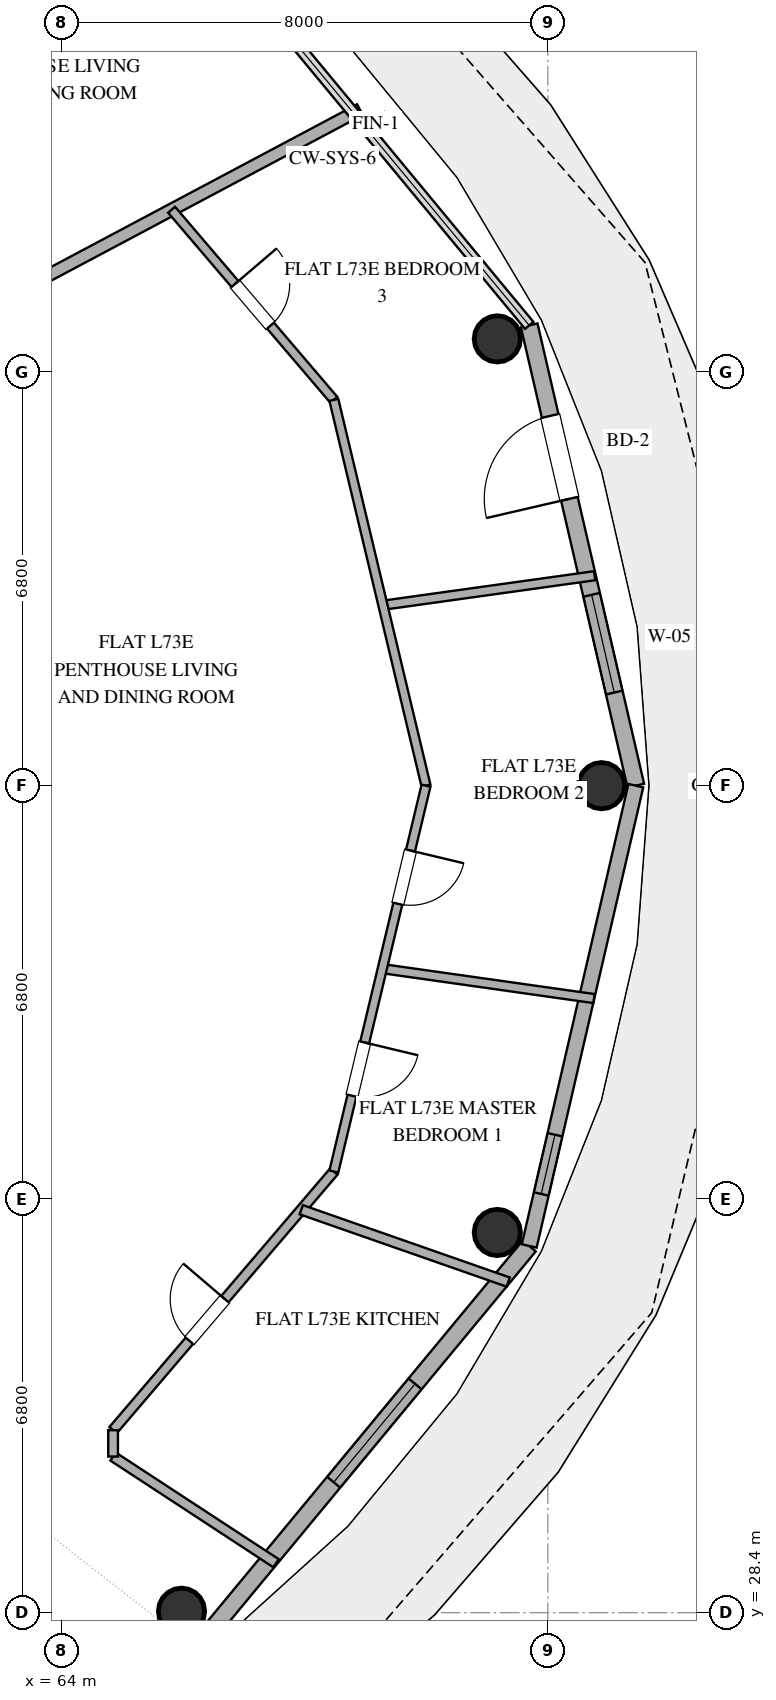
"""IFC4 building model, lengths in metres.
Left out: names, types, materials, properties, quantities, classifications, styles, units other than length and angle.
Written with IfcOpenShell. Run it as: python <this file> out.ifc"""

import sys

from ifc_helpers import new_model, si_unit, direction, frame, frame_2d, origin, origin_2d, place, context, subcontext, project, spatial, rectangle, hollow_circle, extrude, element, fill, save


model = new_model("IFC4")
c1 = context("Model", 3, precision=1e-05, world=origin(), true_north=direction((0.0, 1.0)))
c2 = subcontext(c1, "Body", "Model", "MODEL_VIEW")
j1 = project(units=[si_unit("LENGTHUNIT", "METRE"), si_unit("PLANEANGLEUNIT", "RADIAN")], contexts=[c1])
p1 = place(None, origin())
s1 = spatial("IfcSite", under=j1, at=p1, CompositionType="ELEMENT")
p2 = place(p1, origin())
s2 = spatial("IfcBuilding", under=s1, at=p2, CompositionType="ELEMENT")
p3 = place(p2, frame((0.0, 0.0, 283.8)))
s3 = spatial("IfcBuildingStorey", under=s2, at=p3, CompositionType="ELEMENT", Elevation=283.8)
for number, where, z_axis, x_axis in (
    (1, (72.883, 42.0, 0.0), (0.0, 0.0, 1.0), (1.0, 0.0, 0.0)),
    (2, (71.169, 49.347, 0.0), (0.0, 0.0, 1.0), (1.0, 0.0, 0.0)),
    (3, (65.975, 28.424, 0.0), (0.0, 0.0, 1.0), (1.0, 0.0, 0.0)),
    (4, (71.169, 34.653, 0.0), (0.0, 0.0, 1.0), (1.0, 0.0, 0.0)),
):
    element("IfcColumn", number, at=place(p3, frame(where, z_axis=z_axis, x_axis=x_axis)), inside=s3, PredefinedType="COLUMN", context=c2, shape_type="SweptSolid", body=[
        extrude(hollow_circle(Radius=0.381, WallThickness=0.025, at=origin_2d()), origin(), (0.0, 0.0, 1.0), 3.37),
    ])
p4 = place(p3, frame((73.447, 42.0, 0.0), z_axis=(0.0, 0.0, 1.0), x_axis=(-0.225635078214, 0.974211892495, 0.0)))
e5 = element("IfcWall", 5, at=p4, inside=s3, PredefinedType="SOLIDWALL", context=c2, shape_type="SweptSolid", body=[
    extrude(rectangle(XDim=7.77, YDim=0.28, at=frame_2d((3.885, 0.0))), origin(), (0.0, 0.0, 1.0), 3.37),
])
p5 = place(p4, frame((1.572, 0.0, 0.85)))
e6 = element("IfcOpeningElement", 6, at=p5, cuts=e5, PredefinedType="OPENING", context=c2, shape_type="SweptSolid", body=[
    extrude(rectangle(XDim=1.65, YDim=2.0, at=frame_2d((0.825, 1.0))), frame((0.0, 0.15, 0.0), z_axis=(0.0, -1.0, 0.0), x_axis=(1.0, 0.0, 0.0)), (0.0, 0.0, 1.0), 0.3),
])
p6 = place(p4, frame((4.842, 0.0, 0.0)))
e7 = element("IfcOpeningElement", 7, at=p6, cuts=e5, PredefinedType="OPENING", context=c2, shape_type="SweptSolid", body=[
    extrude(rectangle(XDim=1.4, YDim=2.2, at=frame_2d((0.7, 1.1))), frame((0.0, 0.15, 0.0), z_axis=(0.0, -1.0, 0.0), x_axis=(1.0, 0.0, 0.0)), (0.0, 0.0, 1.0), 0.3),
])
p7 = place(p3, frame((66.383, 28.013, 0.0), z_axis=(0.0, 0.0, 1.0), x_axis=(0.63761509934, 0.770355103243, 0.0)))
e8 = element("IfcWall", 8, at=p7, inside=s3, PredefinedType="SOLIDWALL", context=c2, shape_type="SweptSolid", body=[
    extrude(rectangle(XDim=8.33, YDim=0.28, at=frame_2d((4.165, 0.0))), origin(), (0.0, 0.0, 1.0), 3.37),
])
p8 = place(p7, frame((3.286, 0.0, 0.85)))
e9 = element("IfcOpeningElement", 9, at=p8, cuts=e8, PredefinedType="OPENING", context=c2, shape_type="SweptSolid", body=[
    extrude(rectangle(XDim=2.1, YDim=2.2, at=frame_2d((1.05, 1.1))), frame((0.0, 0.15, 0.0), z_axis=(0.0, -1.0, 0.0), x_axis=(1.0, 0.0, 0.0)), (0.0, 0.0, 1.0), 0.3),
])
p9 = place(p3, frame((71.694, 34.43, 0.0), z_axis=(0.0, 0.0, 1.0), x_axis=(0.225635078214, 0.974211892495, 0.0)))
e10 = element("IfcWall", 10, at=p9, inside=s3, PredefinedType="SOLIDWALL", context=c2, shape_type="SweptSolid", body=[
    extrude(rectangle(XDim=7.77, YDim=0.25, at=frame_2d((3.885, 0.0))), origin(), (0.0, 0.0, 1.0), 3.37),
])
p10 = place(p9, frame((0.878, 0.0, 0.35)))
e11 = element("IfcOpeningElement", 11, at=p10, cuts=e10, PredefinedType="OPENING", context=c2, shape_type="SweptSolid", body=[
    extrude(rectangle(XDim=1.0, YDim=1.05, at=frame_2d((0.5, 0.525))), frame((0.0, 0.135, 0.0), z_axis=(0.0, -1.0, 0.0), x_axis=(1.0, 0.0, 0.0)), (0.0, 0.0, 1.0), 0.27),
])
p11 = place(p3, frame((68.909, 53.118, 0.0), z_axis=(0.0, 0.0, 1.0), x_axis=(-0.882939716422, -0.469486375909, 0.0)))
e12 = element("IfcWall", 12, at=p11, inside=s3, PredefinedType="PARTITIONING", context=c2, shape_type="SweptSolid", body=[
    extrude(rectangle(XDim=8.732, YDim=0.2, at=frame_2d((4.366, 0.0))), origin(), (0.0, 0.0, 1.0), 2.73),
])
p12 = place(p3, frame((64.85, 31.401, 0.0), z_axis=(0.0, 0.0, 1.0), x_axis=(0.649208179997, 0.760610767097, 0.0)))
e13 = element("IfcWall", 13, at=p12, inside=s3, PredefinedType="PLUMBINGWALL", context=c2, shape_type="SweptSolid", body=[
    extrude(rectangle(XDim=5.593, YDim=0.16, at=frame_2d((2.796, 0.0))), origin(), (0.0, 0.0, 1.0), 2.73),
])
p13 = place(p12, frame((1.933, 0.0, 0.0)))
e14 = element("IfcOpeningElement", 14, at=p13, cuts=e13, PredefinedType="OPENING", context=c2, shape_type="SweptSolid", body=[
    extrude(rectangle(XDim=0.9, YDim=2.1, at=frame_2d((0.45, 1.05))), frame((0.0, 0.09, 0.0), z_axis=(0.0, -1.0, 0.0), x_axis=(1.0, 0.0, 0.0)), (0.0, 0.0, 1.0), 0.18),
])
p14 = place(p3, frame((65.812, 51.471, 0.0), z_axis=(0.0, 0.0, 1.0), x_axis=(0.649224667474, -0.760596694145, 0.0)))
e15 = element("IfcWall", 15, at=p14, inside=s3, PredefinedType="PARTITIONING", context=c2, shape_type="SweptSolid", body=[
    extrude(rectangle(XDim=4.11, YDim=0.15, at=frame_2d((2.055, 0.0))), origin(), (0.0, 0.0, 1.0), 2.73),
])
p15 = place(p14, frame((1.605, 0.0, 0.0)))
e16 = element("IfcOpeningElement", 16, at=p15, cuts=e15, PredefinedType="OPENING", context=c2, shape_type="SweptSolid", body=[
    extrude(rectangle(XDim=0.9, YDim=2.1, at=frame_2d((0.45, 1.05))), frame((0.0, 0.085, 0.0), z_axis=(0.0, -1.0, 0.0), x_axis=(1.0, 0.0, 0.0)), (0.0, 0.0, 1.0), 0.17),
])
p16 = place(p3, frame((71.348, 33.837, 0.0), z_axis=(0.0, 0.0, 1.0), x_axis=(-0.943978629209, 0.330006587202, 0.0)))
e17 = element("IfcWall", 17, at=p16, inside=s3, PredefinedType="PLUMBINGWALL", context=c2, shape_type="SweptSolid", body=[
    extrude(rectangle(XDim=3.606, YDim=0.16, at=frame_2d((1.803, 0.0))), origin(), (0.0, 0.0, 1.0), 2.73),
])
p17 = place(p3, frame((69.288, 44.967, 0.0), z_axis=(0.0, 0.0, 1.0), x_axis=(0.990426984163, 0.138037636323, 0.0)))
e18 = element("IfcWall", 18, at=p17, inside=s3, PredefinedType="PARTITIONING", context=c2, shape_type="SweptSolid", body=[
    extrude(rectangle(XDim=3.516, YDim=0.15, at=frame_2d((1.758, 0.0))), origin(), (0.0, 0.0, 1.0), 2.73),
])
p18 = place(p3, frame((72.759, 38.499, 0.0), z_axis=(0.0, 0.0, 1.0), x_axis=(-0.990152617328, 0.139992122627, 0.0)))
e19 = element("IfcWall", 19, at=p18, inside=s3, PredefinedType="PARTITIONING", context=c2, shape_type="SweptSolid", body=[
    extrude(rectangle(XDim=3.516, YDim=0.15, at=frame_2d((1.758, 0.0))), origin(), (0.0, 0.0, 1.0), 2.73),
])
p19 = place(p3, frame((68.481, 48.345, 0.0), z_axis=(0.0, 0.0, 1.0), x_axis=(0.232298462197, -0.972644551962, 0.0)))
e20 = element("IfcWall", 20, at=p19, inside=s3, PredefinedType="PARTITIONING", context=c2, shape_type="SweptSolid", body=[
    extrude(rectangle(XDim=6.523, YDim=0.15, at=frame_2d((3.262, 0.0))), origin(), (0.0, 0.0, 1.0), 2.73),
])
p20 = place(p3, frame((69.996, 42.0, 0.0), z_axis=(0.0, 0.0, 1.0), x_axis=(-0.232298462197, -0.972644551962, 0.0)))
e21 = element("IfcWall", 21, at=p20, inside=s3, PredefinedType="PARTITIONING", context=c2, shape_type="SweptSolid", body=[
    extrude(rectangle(XDim=6.523, YDim=0.15, at=frame_2d((3.262, 0.0))), origin(), (0.0, 0.0, 1.0), 2.73),
])
p21 = place(p20, frame((4.342, 0.0, 0.0)))
e22 = element("IfcOpeningElement", 22, at=p21, cuts=e21, PredefinedType="OPENING", context=c2, shape_type="SweptSolid", body=[
    extrude(rectangle(XDim=0.9, YDim=2.1, at=frame_2d((0.45, 1.05))), frame((0.0, 0.085, 0.0), z_axis=(0.0, -1.0, 0.0), x_axis=(1.0, 0.0, 0.0)), (0.0, 0.0, 1.0), 0.17),
])
p22 = place(p20, frame((1.097, 0.0, 0.0)))
e23 = element("IfcOpeningElement", 23, at=p22, cuts=e21, PredefinedType="OPENING", context=c2, shape_type="SweptSolid", body=[
    extrude(rectangle(XDim=0.9, YDim=2.1, at=frame_2d((0.45, 1.05))), frame((0.0, 0.085, 0.0), z_axis=(0.0, -1.0, 0.0), x_axis=(1.0, 0.0, 0.0)), (0.0, 0.0, 1.0), 0.17),
])
p23 = place(p3, frame((67.53, 29.213, 0.0), z_axis=(0.0, 0.0, 1.0), x_axis=(-0.836629755679, 0.547768794212, 0.0)))
e24 = element("IfcWall", 24, at=p23, inside=s3, PredefinedType="PLUMBINGWALL", context=c2, shape_type="SweptSolid", body=[
    extrude(rectangle(XDim=3.203, YDim=0.16, at=frame_2d((1.602, 0.0))), origin(), (0.0, 0.0, 1.0), 2.73),
])
p24 = place(p3, frame((64.85, 30.968, 0.0), z_axis=(0.0, 0.0, 1.0), x_axis=(0.0, 1.0, 0.0)))
e25 = element("IfcWall", 25, at=p24, inside=s3, PredefinedType="PLUMBINGWALL", context=c2, shape_type="SweptSolid", body=[
    extrude(rectangle(XDim=0.434, YDim=0.16, at=frame_2d((0.217, 0.0))), origin(), (0.0, 0.0, 1.0), 2.73),
])
p25 = place(p5, origin())
e26 = element("IfcWindow", 26, at=p25, inside=s3, PartitioningType="SINGLE_PANEL", PredefinedType="WINDOW", context=c2, shape_type="SweptSolid", body=[
    extrude(rectangle(XDim=1.65, YDim=2.0, at=frame_2d((0.825, 1.0))), frame((0.0, 0.03, 0.0), z_axis=(0.0, -1.0, 0.0), x_axis=(1.0, 0.0, 0.0)), (0.0, 0.0, 1.0), 0.06),
])
fill(e6, e26)
p26 = place(p6, origin())
e27 = element("IfcDoor", 27, at=p26, inside=s3, OperationType="SINGLE_SWING_LEFT", PredefinedType="DOOR", context=c2, shape_type="SweptSolid", body=[
    extrude(rectangle(XDim=1.4, YDim=2.2, at=frame_2d((0.7, 1.1))), frame((0.0, 0.025, 0.0), z_axis=(0.0, -1.0, 0.0), x_axis=(1.0, 0.0, 0.0)), (0.0, 0.0, 1.0), 0.05),
])
fill(e7, e27)
p27 = place(p8, origin())
e28 = element("IfcWindow", 28, at=p27, inside=s3, PartitioningType="SINGLE_PANEL", PredefinedType="WINDOW", context=c2, shape_type="SweptSolid", body=[
    extrude(rectangle(XDim=2.1, YDim=2.2, at=frame_2d((1.05, 1.1))), frame((0.0, 0.03, 0.0), z_axis=(0.0, -1.0, 0.0), x_axis=(1.0, 0.0, 0.0)), (0.0, 0.0, 1.0), 0.06),
])
fill(e9, e28)
p28 = place(p10, origin())
e29 = element("IfcWindow", 29, at=p28, inside=s3, PartitioningType="SINGLE_PANEL", PredefinedType="WINDOW", context=c2, shape_type="SweptSolid", body=[
    extrude(rectangle(XDim=1.0, YDim=1.05, at=frame_2d((0.5, 0.525))), frame((0.0, 0.03, 0.0), z_axis=(0.0, -1.0, 0.0), x_axis=(1.0, 0.0, 0.0)), (0.0, 0.0, 1.0), 0.06),
])
fill(e11, e29)
p29 = place(p13, origin())
e30 = element("IfcDoor", 30, at=p29, inside=s3, OperationType="SINGLE_SWING_RIGHT", PredefinedType="DOOR", context=c2, shape_type="SweptSolid", body=[
    extrude(rectangle(XDim=0.9, YDim=2.1, at=frame_2d((0.45, 1.05))), frame((0.0, 0.025, 0.0), z_axis=(0.0, -1.0, 0.0), x_axis=(1.0, 0.0, 0.0)), (0.0, 0.0, 1.0), 0.05),
])
fill(e14, e30)
p30 = place(p15, origin())
e31 = element("IfcDoor", 31, at=p30, inside=s3, OperationType="SINGLE_SWING_LEFT", PredefinedType="DOOR", context=c2, shape_type="SweptSolid", body=[
    extrude(rectangle(XDim=0.9, YDim=2.1, at=frame_2d((0.45, 1.05))), frame((0.0, 0.025, 0.0), z_axis=(0.0, -1.0, 0.0), x_axis=(1.0, 0.0, 0.0)), (0.0, 0.0, 1.0), 0.05),
])
fill(e16, e31)
p31 = place(p21, origin())
e32 = element("IfcDoor", 32, at=p31, inside=s3, OperationType="SINGLE_SWING_LEFT", PredefinedType="DOOR", context=c2, shape_type="SweptSolid", body=[
    extrude(rectangle(XDim=0.9, YDim=2.1, at=frame_2d((0.45, 1.05))), frame((0.0, 0.025, 0.0), z_axis=(0.0, -1.0, 0.0), x_axis=(1.0, 0.0, 0.0)), (0.0, 0.0, 1.0), 0.05),
])
fill(e22, e32)
p32 = place(p22, origin())
e33 = element("IfcDoor", 33, at=p32, inside=s3, OperationType="SINGLE_SWING_LEFT", PredefinedType="DOOR", context=c2, shape_type="SweptSolid", body=[
    extrude(rectangle(XDim=0.9, YDim=2.1, at=frame_2d((0.45, 1.05))), frame((0.0, 0.025, 0.0), z_axis=(0.0, -1.0, 0.0), x_axis=(1.0, 0.0, 0.0)), (0.0, 0.0, 1.0), 0.05),
])
fill(e23, e33)
save(model, sys.argv[1])
